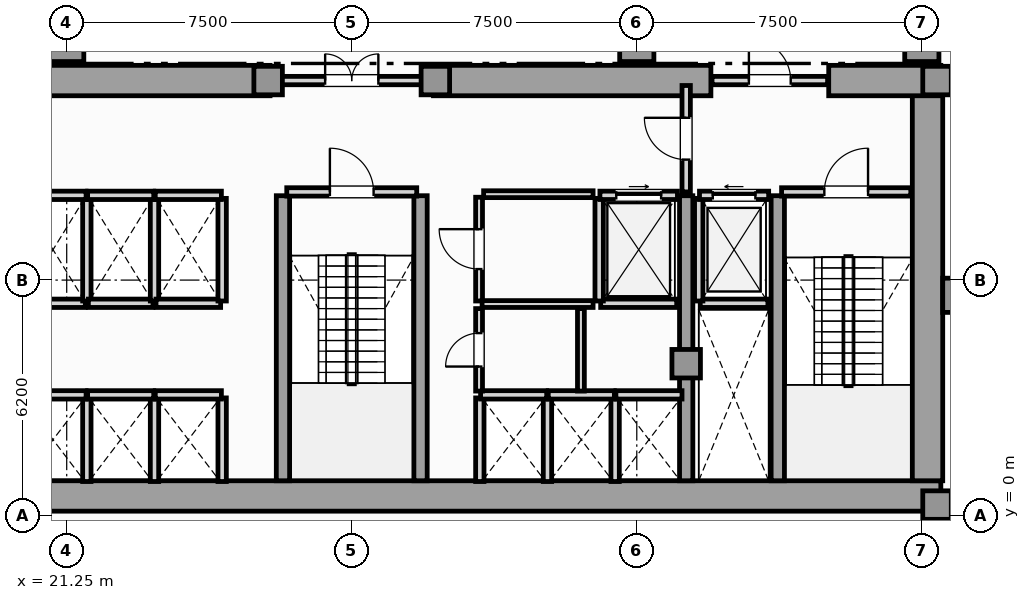
"""IFC4 building model, lengths in metres.
Left out: names, types, materials, properties, quantities, classifications, styles, units other than length and angle.
Written with IfcOpenShell. Run it as: python <this file> out.ifc"""

import sys

from ifc_helpers import new_model, si_unit, direction, frame, frame_2d, origin, origin_2d, place, context, subcontext, project, spatial, rectangle, extrude, element, fill, save


model = new_model("IFC4")
c1 = context("Model", 3, precision=1e-05, world=origin(), true_north=direction((0.0, 1.0)))
c2 = subcontext(c1, "Body", "Model", "MODEL_VIEW")
j1 = project(units=[si_unit("LENGTHUNIT", "METRE"), si_unit("PLANEANGLEUNIT", "RADIAN")], contexts=[c1])
p1 = place(None, origin())
s1 = spatial("IfcSite", under=j1, at=p1, CompositionType="ELEMENT")
p2 = place(p1, origin())
s2 = spatial("IfcBuilding", under=s1, at=p2, CompositionType="ELEMENT")
p3 = place(p2, frame((0.0, 0.0, 10.2)))
s3 = spatial("IfcBuildingStorey", under=s2, at=p3, CompositionType="ELEMENT", Elevation=10.2)
p4 = place(p3, frame((13.25, 0.52, 0.0), z_axis=(0.0, 0.0, 1.0), x_axis=(1.0, 0.0, 0.0)))
e1 = element("IfcWall", 1, at=p4, inside=s3, PredefinedType="SHEAR", context=c2, shape_type="SweptSolid", body=[
    extrude(rectangle(XDim=31.0, YDim=0.8, at=frame_2d((15.5, 0.0))), origin(), (0.0, 0.0, 1.0), 4.52),
])
p5 = place(p3, frame((43.9, 0.92, 0.0), z_axis=(0.0, 0.0, 1.0), x_axis=(0.0, 1.0, 0.0)))
e2 = element("IfcWall", 2, at=p5, inside=s3, PredefinedType="SHEAR", context=c2, shape_type="SweptSolid", body=[
    extrude(rectangle(XDim=10.53, YDim=0.8, at=frame_2d((5.265, 0.0))), origin(), (0.0, 0.0, 1.0), 4.52),
])
for number, where, z_axis, x_axis in (
    (3, (19.3, 11.45, 0.0), (0.0, 0.0, 1.0), (1.0, 0.0, 0.0)),
    (4, (30.9, 11.45, 0.0), (0.0, 0.0, 1.0), (1.0, 0.0, 0.0)),
):
    element("IfcWall", number, at=place(p3, frame(where, z_axis=z_axis, x_axis=x_axis)), inside=s3, PredefinedType="SHEAR", context=c2, shape_type="SweptSolid", body=[
        extrude(rectangle(XDim=7.3, YDim=0.8, at=frame_2d((3.65, 0.0))), origin(), (0.0, 0.0, 1.0), 4.52),
    ])
p6 = place(p3, frame((41.3, 11.45, 0.0), z_axis=(0.0, 0.0, 1.0), x_axis=(1.0, 0.0, 0.0)))
e5 = element("IfcWall", 5, at=p6, inside=s3, PredefinedType="SHEAR", context=c2, shape_type="SweptSolid", body=[
    extrude(rectangle(XDim=2.95, YDim=0.8, at=frame_2d((1.475, 0.0))), origin(), (0.0, 0.0, 1.0), 4.52),
])
for number, where, z_axis, x_axis in (
    (6, (26.94, 0.92, 0.0), (0.0, 0.0, 1.0), (0.0, 1.0, 0.0)),
    (7, (30.56, 0.92, 0.0), (0.0, 0.0, 1.0), (0.0, 1.0, 0.0)),
    (8, (37.55, 0.92, 0.0), (0.0, 0.0, 1.0), (0.0, 1.0, 0.0)),
    (9, (39.96, 0.92, 0.0), (0.0, 0.0, 1.0), (0.0, 1.0, 0.0)),
):
    element("IfcWall", number, at=place(p3, frame(where, z_axis=z_axis, x_axis=x_axis)), inside=s3, PredefinedType="SHEAR", context=c2, shape_type="SweptSolid", body=[
        extrude(rectangle(XDim=7.5, YDim=0.35, at=frame_2d((3.75, 0.0))), origin(), (0.0, 0.0, 1.0), 4.52),
    ])
p7 = place(p3, frame((44.6, 5.8, 0.0), z_axis=(0.0, 0.0, 1.0), x_axis=(1.0, 0.0, 0.0)))
e10 = element("IfcColumn", 10, at=p7, inside=s3, PredefinedType="PILASTER", context=c2, shape_type="SweptSolid", body=[
    extrude(rectangle(XDim=0.6, YDim=0.9, at=origin_2d()), origin(), (0.0, 0.0, 1.0), 4.8),
])
for number, where, z_axis, x_axis in (
    (11, (44.15, 0.28, 0.0), (0.0, 0.0, 1.0), (1.0, 0.0, 0.0)),
    (12, (44.15, 11.45, 0.0), (0.0, 0.0, 1.0), (1.0, 0.0, 0.0)),
    (13, (37.55, 4.0, 0.0), (0.0, 0.0, 1.0), (1.0, 0.0, 0.0)),
    (14, (26.55, 11.45, 0.0), (0.0, 0.0, 1.0), (1.0, 0.0, 0.0)),
    (15, (30.95, 11.45, 0.0), (0.0, 0.0, 1.0), (1.0, 0.0, 0.0)),
):
    element("IfcColumn", number, at=place(p3, frame(where, z_axis=z_axis, x_axis=x_axis)), inside=s3, PredefinedType="COLUMN", context=c2, shape_type="SweptSolid", body=[
        extrude(rectangle(XDim=0.75, YDim=0.75, at=origin_2d()), origin(), (0.0, 0.0, 1.0), 4.8),
    ])
for number, where, z_axis, x_axis in (
    (16, (43.75, 12.4, 0.0), (0.0, 0.0, 1.0), (1.0, 0.0, 0.0)),
    (17, (21.25, 12.4, 0.0), (0.0, 0.0, 1.0), (1.0, 0.0, 0.0)),
    (18, (36.25, 12.4, 0.0), (0.0, 0.0, 1.0), (1.0, 0.0, 0.0)),
):
    element("IfcColumn", number, at=place(p3, frame(where, z_axis=z_axis, x_axis=x_axis)), inside=s3, PredefinedType="COLUMN", context=c2, shape_type="SweptSolid", body=[
        extrude(rectangle(XDim=0.9, YDim=0.9, at=origin_2d()), origin(), (0.0, 0.0, 1.0), 4.8),
    ])
p8 = place(p3, frame((37.92, 5.59, 0.0), z_axis=(0.0, 0.0, 1.0), x_axis=(1.0, 0.0, 0.0)))
e19 = element("IfcWall", 19, at=p8, inside=s3, PredefinedType="SOLIDWALL", context=c2, shape_type="SweptSolid", body=[
    extrude(rectangle(XDim=1.78, YDim=0.22, at=frame_2d((0.89, 0.0))), origin(), (0.0, 0.0, 1.0), 4.52),
])
p9 = place(p3, frame((37.88, 5.65, 0.0), z_axis=(0.0, 0.0, 1.0), x_axis=(0.0, 1.0, 0.0)))
e20 = element("IfcWall", 20, at=p9, inside=s3, PredefinedType="SOLIDWALL", context=c2, shape_type="SweptSolid", body=[
    extrude(rectangle(XDim=2.7, YDim=0.22, at=frame_2d((1.35, 0.0))), origin(), (0.0, 0.0, 1.0), 4.52),
])
p10 = place(p3, frame((37.9, 8.43, 0.0), z_axis=(0.0, 0.0, 1.0), x_axis=(1.0, 0.0, 0.0)))
e21 = element("IfcWall", 21, at=p10, inside=s3, PredefinedType="SOLIDWALL", context=c2, shape_type="SweptSolid", body=[
    extrude(rectangle(XDim=1.82, YDim=0.22, at=frame_2d((0.91, 0.0))), origin(), (0.0, 0.0, 1.0), 4.52),
])
p11 = place(p10, frame((0.35, 0.0, 0.0)))
e22 = element("IfcOpeningElement", 22, at=p11, cuts=e21, PredefinedType="OPENING", context=c2, shape_type="SweptSolid", body=[
    extrude(rectangle(XDim=1.12, YDim=2.25, at=frame_2d((0.56, 1.125))), frame((0.0, 0.12, 0.0), z_axis=(0.0, -1.0, 0.0), x_axis=(1.0, 0.0, 0.0)), (0.0, 0.0, 1.0), 0.24),
])
p12 = place(p3, frame((35.3, 5.59, 0.0), z_axis=(0.0, 0.0, 1.0), x_axis=(1.0, 0.0, 0.0)))
e23 = element("IfcWall", 23, at=p12, inside=s3, PredefinedType="SOLIDWALL", context=c2, shape_type="SweptSolid", body=[
    extrude(rectangle(XDim=2.0, YDim=0.22, at=frame_2d((1.0, 0.0))), origin(), (0.0, 0.0, 1.0), 4.52),
])
p13 = place(p3, frame((35.26, 5.65, 0.0), z_axis=(0.0, 0.0, 1.0), x_axis=(0.0, 1.0, 0.0)))
e24 = element("IfcWall", 24, at=p13, inside=s3, PredefinedType="SOLIDWALL", context=c2, shape_type="SweptSolid", body=[
    extrude(rectangle(XDim=2.7, YDim=0.22, at=frame_2d((1.35, 0.0))), origin(), (0.0, 0.0, 1.0), 4.52),
])
p14 = place(p3, frame((35.28, 8.43, 0.0), z_axis=(0.0, 0.0, 1.0), x_axis=(1.0, 0.0, 0.0)))
e25 = element("IfcWall", 25, at=p14, inside=s3, PredefinedType="SOLIDWALL", context=c2, shape_type="SweptSolid", body=[
    extrude(rectangle(XDim=2.04, YDim=0.22, at=frame_2d((1.02, 0.0))), origin(), (0.0, 0.0, 1.0), 4.52),
])
p15 = place(p14, frame((0.43, 0.0, 0.0)))
e26 = element("IfcOpeningElement", 26, at=p15, cuts=e25, PredefinedType="OPENING", context=c2, shape_type="SweptSolid", body=[
    extrude(rectangle(XDim=1.18, YDim=2.2, at=frame_2d((0.59, 1.1))), frame((0.0, 0.12, 0.0), z_axis=(0.0, -1.0, 0.0), x_axis=(1.0, 0.0, 0.0)), (0.0, 0.0, 1.0), 0.24),
])
p16 = place(p3, frame((21.78, 0.9, 0.0), z_axis=(0.0, 0.0, 1.0), x_axis=(0.0, 1.0, 0.0)))
e27 = element("IfcWall", 27, at=p16, inside=s3, PredefinedType="SOLIDWALL", context=c2, shape_type="SweptSolid", body=[
    extrude(rectangle(XDim=2.2, YDim=0.22, at=frame_2d((1.1, 0.0))), origin(), (0.0, 0.0, 1.0), 4.52),
])
p17 = place(p3, frame((20.02, 3.18, 0.0), z_axis=(0.0, 0.0, 1.0), x_axis=(1.0, 0.0, 0.0)))
e28 = element("IfcWall", 28, at=p17, inside=s3, PredefinedType="SOLIDWALL", context=c2, shape_type="SweptSolid", body=[
    extrude(rectangle(XDim=1.74, YDim=0.22, at=frame_2d((0.87, 0.0))), origin(), (0.0, 0.0, 1.0), 4.52),
])
p18 = place(p3, frame((23.56, 0.9, 0.0), z_axis=(0.0, 0.0, 1.0), x_axis=(0.0, 1.0, 0.0)))
e29 = element("IfcWall", 29, at=p18, inside=s3, PredefinedType="SOLIDWALL", context=c2, shape_type="SweptSolid", body=[
    extrude(rectangle(XDim=2.2, YDim=0.22, at=frame_2d((1.1, 0.0))), origin(), (0.0, 0.0, 1.0), 4.52),
])
p19 = place(p3, frame((21.8, 3.18, 0.0), z_axis=(0.0, 0.0, 1.0), x_axis=(1.0, 0.0, 0.0)))
e30 = element("IfcWall", 30, at=p19, inside=s3, PredefinedType="SOLIDWALL", context=c2, shape_type="SweptSolid", body=[
    extrude(rectangle(XDim=1.74, YDim=0.22, at=frame_2d((0.87, 0.0))), origin(), (0.0, 0.0, 1.0), 4.52),
])
p20 = place(p3, frame((25.34, 0.9, 0.0), z_axis=(0.0, 0.0, 1.0), x_axis=(0.0, 1.0, 0.0)))
e31 = element("IfcWall", 31, at=p20, inside=s3, PredefinedType="SOLIDWALL", context=c2, shape_type="SweptSolid", body=[
    extrude(rectangle(XDim=2.2, YDim=0.22, at=frame_2d((1.1, 0.0))), origin(), (0.0, 0.0, 1.0), 4.52),
])
p21 = place(p3, frame((23.58, 3.18, 0.0), z_axis=(0.0, 0.0, 1.0), x_axis=(1.0, 0.0, 0.0)))
e32 = element("IfcWall", 32, at=p21, inside=s3, PredefinedType="SOLIDWALL", context=c2, shape_type="SweptSolid", body=[
    extrude(rectangle(XDim=1.74, YDim=0.22, at=frame_2d((0.87, 0.0))), origin(), (0.0, 0.0, 1.0), 4.52),
])
for number, where, z_axis, x_axis in (
    (33, (32.12, 0.9, 0.0), (0.0, 0.0, 1.0), (0.0, 1.0, 0.0)),
    (34, (33.9, 0.9, 0.0), (0.0, 0.0, 1.0), (0.0, 1.0, 0.0)),
):
    element("IfcWall", number, at=place(p3, frame(where, z_axis=z_axis, x_axis=x_axis)), inside=s3, PredefinedType="SOLIDWALL", context=c2, shape_type="SweptSolid", body=[
        extrude(rectangle(XDim=2.2, YDim=0.22, at=frame_2d((1.1, 0.0))), origin(), (0.0, 0.0, 1.0), 4.52),
    ])
p22 = place(p3, frame((32.14, 3.18, 0.0), z_axis=(0.0, 0.0, 1.0), x_axis=(1.0, 0.0, 0.0)))
e35 = element("IfcWall", 35, at=p22, inside=s3, PredefinedType="SOLIDWALL", context=c2, shape_type="SweptSolid", body=[
    extrude(rectangle(XDim=1.74, YDim=0.22, at=frame_2d((0.87, 0.0))), origin(), (0.0, 0.0, 1.0), 4.52),
])
p23 = place(p3, frame((35.68, 0.9, 0.0), z_axis=(0.0, 0.0, 1.0), x_axis=(0.0, 1.0, 0.0)))
e36 = element("IfcWall", 36, at=p23, inside=s3, PredefinedType="SOLIDWALL", context=c2, shape_type="SweptSolid", body=[
    extrude(rectangle(XDim=2.2, YDim=0.22, at=frame_2d((1.1, 0.0))), origin(), (0.0, 0.0, 1.0), 4.52),
])
for number, where, z_axis, x_axis in (
    (37, (33.92, 3.18, 0.0), (0.0, 0.0, 1.0), (1.0, 0.0, 0.0)),
    (38, (35.7, 3.18, 0.0), (0.0, 0.0, 1.0), (1.0, 0.0, 0.0)),
):
    element("IfcWall", number, at=place(p3, frame(where, z_axis=z_axis, x_axis=x_axis)), inside=s3, PredefinedType="SOLIDWALL", context=c2, shape_type="SweptSolid", body=[
        extrude(rectangle(XDim=1.74, YDim=0.22, at=frame_2d((0.87, 0.0))), origin(), (0.0, 0.0, 1.0), 4.52),
    ])
p24 = place(p3, frame((20.04, 5.59, 0.0), z_axis=(0.0, 0.0, 1.0), x_axis=(1.0, 0.0, 0.0)))
e39 = element("IfcWall", 39, at=p24, inside=s3, PredefinedType="SOLIDWALL", context=c2, shape_type="SweptSolid", body=[
    extrude(rectangle(XDim=1.7, YDim=0.22, at=frame_2d((0.85, 0.0))), origin(), (0.0, 0.0, 1.0), 4.52),
])
p25 = place(p3, frame((21.78, 5.65, 0.0), z_axis=(0.0, 0.0, 1.0), x_axis=(0.0, 1.0, 0.0)))
e40 = element("IfcWall", 40, at=p25, inside=s3, PredefinedType="SOLIDWALL", context=c2, shape_type="SweptSolid", body=[
    extrude(rectangle(XDim=2.7, YDim=0.22, at=frame_2d((1.35, 0.0))), origin(), (0.0, 0.0, 1.0), 4.52),
])
p26 = place(p3, frame((20.02, 8.43, 0.0), z_axis=(0.0, 0.0, 1.0), x_axis=(1.0, 0.0, 0.0)))
e41 = element("IfcWall", 41, at=p26, inside=s3, PredefinedType="SOLIDWALL", context=c2, shape_type="SweptSolid", body=[
    extrude(rectangle(XDim=1.74, YDim=0.22, at=frame_2d((0.87, 0.0))), origin(), (0.0, 0.0, 1.0), 4.52),
])
p27 = place(p3, frame((21.82, 5.59, 0.0), z_axis=(0.0, 0.0, 1.0), x_axis=(1.0, 0.0, 0.0)))
e42 = element("IfcWall", 42, at=p27, inside=s3, PredefinedType="SOLIDWALL", context=c2, shape_type="SweptSolid", body=[
    extrude(rectangle(XDim=1.7, YDim=0.22, at=frame_2d((0.85, 0.0))), origin(), (0.0, 0.0, 1.0), 4.52),
])
p28 = place(p3, frame((23.56, 5.65, 0.0), z_axis=(0.0, 0.0, 1.0), x_axis=(0.0, 1.0, 0.0)))
e43 = element("IfcWall", 43, at=p28, inside=s3, PredefinedType="SOLIDWALL", context=c2, shape_type="SweptSolid", body=[
    extrude(rectangle(XDim=2.7, YDim=0.22, at=frame_2d((1.35, 0.0))), origin(), (0.0, 0.0, 1.0), 4.52),
])
p29 = place(p3, frame((21.8, 8.43, 0.0), z_axis=(0.0, 0.0, 1.0), x_axis=(1.0, 0.0, 0.0)))
e44 = element("IfcWall", 44, at=p29, inside=s3, PredefinedType="SOLIDWALL", context=c2, shape_type="SweptSolid", body=[
    extrude(rectangle(XDim=1.74, YDim=0.22, at=frame_2d((0.87, 0.0))), origin(), (0.0, 0.0, 1.0), 4.52),
])
p30 = place(p3, frame((23.6, 5.59, 0.0), z_axis=(0.0, 0.0, 1.0), x_axis=(1.0, 0.0, 0.0)))
e45 = element("IfcWall", 45, at=p30, inside=s3, PredefinedType="SOLIDWALL", context=c2, shape_type="SweptSolid", body=[
    extrude(rectangle(XDim=1.7, YDim=0.22, at=frame_2d((0.85, 0.0))), origin(), (0.0, 0.0, 1.0), 4.52),
])
p31 = place(p3, frame((25.34, 5.65, 0.0), z_axis=(0.0, 0.0, 1.0), x_axis=(0.0, 1.0, 0.0)))
e46 = element("IfcWall", 46, at=p31, inside=s3, PredefinedType="SOLIDWALL", context=c2, shape_type="SweptSolid", body=[
    extrude(rectangle(XDim=2.7, YDim=0.22, at=frame_2d((1.35, 0.0))), origin(), (0.0, 0.0, 1.0), 4.52),
])
p32 = place(p3, frame((23.58, 8.43, 0.0), z_axis=(0.0, 0.0, 1.0), x_axis=(1.0, 0.0, 0.0)))
e47 = element("IfcWall", 47, at=p32, inside=s3, PredefinedType="SOLIDWALL", context=c2, shape_type="SweptSolid", body=[
    extrude(rectangle(XDim=1.74, YDim=0.22, at=frame_2d((0.87, 0.0))), origin(), (0.0, 0.0, 1.0), 4.52),
])
p33 = place(p3, frame((40.06, 8.52, 0.0), z_axis=(0.0, 0.0, 1.0), x_axis=(1.0, 0.0, 0.0)))
e48 = element("IfcWall", 48, at=p33, inside=s3, PredefinedType="SOLIDWALL", context=c2, shape_type="SweptSolid", body=[
    extrude(rectangle(XDim=3.4, YDim=0.22, at=frame_2d((1.7, 0.0))), origin(), (0.0, 0.0, 1.0), 4.52),
])
p34 = place(p33, frame((1.125, 0.0, 0.0)))
e49 = element("IfcOpeningElement", 49, at=p34, cuts=e48, PredefinedType="OPENING", context=c2, shape_type="SweptSolid", body=[
    extrude(rectangle(XDim=1.15, YDim=2.2, at=frame_2d((0.575, 1.1))), frame((0.0, 0.12, 0.0), z_axis=(0.0, -1.0, 0.0), x_axis=(1.0, 0.0, 0.0)), (0.0, 0.0, 1.0), 0.24),
])
p35 = place(p3, frame((27.04, 8.52, 0.0), z_axis=(0.0, 0.0, 1.0), x_axis=(1.0, 0.0, 0.0)))
e50 = element("IfcWall", 50, at=p35, inside=s3, PredefinedType="SOLIDWALL", context=c2, shape_type="SweptSolid", body=[
    extrude(rectangle(XDim=3.42, YDim=0.22, at=frame_2d((1.71, 0.0))), origin(), (0.0, 0.0, 1.0), 4.52),
])
p36 = place(p35, frame((1.135, 0.0, 0.0)))
e51 = element("IfcOpeningElement", 51, at=p36, cuts=e50, PredefinedType="OPENING", context=c2, shape_type="SweptSolid", body=[
    extrude(rectangle(XDim=1.15, YDim=2.2, at=frame_2d((0.575, 1.1))), frame((0.0, 0.12, 0.0), z_axis=(0.0, -1.0, 0.0), x_axis=(1.0, 0.0, 0.0)), (0.0, 0.0, 1.0), 0.24),
])
p37 = place(p3, frame((37.55, 8.52, 0.0), z_axis=(0.0, 0.0, 1.0), x_axis=(0.0, 1.0, 0.0)))
e52 = element("IfcWall", 52, at=p37, inside=s3, PredefinedType="SOLIDWALL", context=c2, shape_type="SweptSolid", body=[
    extrude(rectangle(XDim=2.8, YDim=0.22, at=frame_2d((1.4, 0.0))), origin(), (0.0, 0.0, 1.0), 3.976),
])
p38 = place(p37, frame((0.85, 0.0, 0.0)))
e53 = element("IfcOpeningElement", 53, at=p38, cuts=e52, PredefinedType="OPENING", context=c2, shape_type="SweptSolid", body=[
    extrude(rectangle(XDim=1.1, YDim=2.2, at=frame_2d((0.55, 1.1))), frame((0.0, 0.12, 0.0), z_axis=(0.0, -1.0, 0.0), x_axis=(1.0, 0.0, 0.0)), (0.0, 0.0, 1.0), 0.24),
])
p39 = place(p3, frame((26.63, 11.45, 0.0), z_axis=(0.0, 0.0, 1.0), x_axis=(1.0, 0.0, 0.0)))
e54 = element("IfcWall", 54, at=p39, inside=s3, PredefinedType="SOLIDWALL", context=c2, shape_type="SweptSolid", body=[
    extrude(rectangle(XDim=4.24, YDim=0.22, at=frame_2d((2.12, 0.0))), origin(), (0.0, 0.0, 1.0), 4.52),
])
p40 = place(p39, frame((1.42, 0.0, 0.0)))
e55 = element("IfcOpeningElement", 55, at=p40, cuts=e54, PredefinedType="OPENING", context=c2, shape_type="SweptSolid", body=[
    extrude(rectangle(XDim=1.4, YDim=2.2, at=frame_2d((0.7, 1.1))), frame((0.0, 0.12, 0.0), z_axis=(0.0, -1.0, 0.0), x_axis=(1.0, 0.0, 0.0)), (0.0, 0.0, 1.0), 0.24),
])
p41 = place(p3, frame((38.23, 11.45, 0.0), z_axis=(0.0, 0.0, 1.0), x_axis=(1.0, 0.0, 0.0)))
e56 = element("IfcWall", 56, at=p41, inside=s3, PredefinedType="SOLIDWALL", context=c2, shape_type="SweptSolid", body=[
    extrude(rectangle(XDim=3.04, YDim=0.22, at=frame_2d((1.52, 0.0))), origin(), (0.0, 0.0, 1.0), 4.52),
])
p42 = place(p41, frame((0.97, 0.0, 0.0)))
e57 = element("IfcOpeningElement", 57, at=p42, cuts=e56, PredefinedType="OPENING", context=c2, shape_type="SweptSolid", body=[
    extrude(rectangle(XDim=1.1, YDim=2.2, at=frame_2d((0.55, 1.1))), frame((0.0, 0.12, 0.0), z_axis=(0.0, -1.0, 0.0), x_axis=(1.0, 0.0, 0.0)), (0.0, 0.0, 1.0), 0.24),
])
p43 = place(p3, frame((32.1, 5.65, 0.0), z_axis=(0.0, 0.0, 1.0), x_axis=(0.0, 1.0, 0.0)))
e58 = element("IfcWall", 58, at=p43, inside=s3, PredefinedType="PARTITIONING", context=c2, shape_type="SweptSolid", body=[
    extrude(rectangle(XDim=2.73, YDim=0.18, at=frame_2d((1.365, 0.0))), origin(), (0.0, 0.0, 1.0), 4.52),
])
p44 = place(p43, frame((0.84, 0.0, 0.0)))
e59 = element("IfcOpeningElement", 59, at=p44, cuts=e58, PredefinedType="OPENING", context=c2, shape_type="SweptSolid", body=[
    extrude(rectangle(XDim=1.05, YDim=2.15, at=frame_2d((0.525, 1.075))), frame((0.0, 0.1, 0.0), z_axis=(0.0, -1.0, 0.0), x_axis=(1.0, 0.0, 0.0)), (0.0, 0.0, 1.0), 0.2),
])
p45 = place(p3, frame((32.22, 8.46, 0.0), z_axis=(0.0, 0.0, 1.0), x_axis=(1.0, 0.0, 0.0)))
e60 = element("IfcWall", 60, at=p45, inside=s3, PredefinedType="PARTITIONING", context=c2, shape_type="SweptSolid", body=[
    extrude(rectangle(XDim=2.88, YDim=0.18, at=frame_2d((1.44, 0.0))), origin(), (0.0, 0.0, 1.0), 4.52),
])
p46 = place(p3, frame((32.18, 5.57, 0.0), z_axis=(0.0, 0.0, 1.0), x_axis=(1.0, 0.0, 0.0)))
e61 = element("IfcWall", 61, at=p46, inside=s3, PredefinedType="PARTITIONING", context=c2, shape_type="SweptSolid", body=[
    extrude(rectangle(XDim=2.92, YDim=0.18, at=frame_2d((1.46, 0.0))), origin(), (0.0, 0.0, 1.0), 4.52),
])
p47 = place(p3, frame((32.1, 3.28, 0.0), z_axis=(0.0, 0.0, 1.0), x_axis=(0.0, 1.0, 0.0)))
e62 = element("IfcWall", 62, at=p47, inside=s3, PredefinedType="PARTITIONING", context=c2, shape_type="SweptSolid", body=[
    extrude(rectangle(XDim=2.17, YDim=0.18, at=frame_2d((1.085, 0.0))), origin(), (0.0, 0.0, 1.0), 4.52),
])
p48 = place(p47, frame((0.645, 0.0, 0.0)))
e63 = element("IfcOpeningElement", 63, at=p48, cuts=e62, PredefinedType="OPENING", context=c2, shape_type="SweptSolid", body=[
    extrude(rectangle(XDim=0.88, YDim=2.05, at=frame_2d((0.44, 1.025))), frame((0.0, 0.1, 0.0), z_axis=(0.0, -1.0, 0.0), x_axis=(1.0, 0.0, 0.0)), (0.0, 0.0, 1.0), 0.2),
])
p49 = place(p3, frame((34.78, 3.28, 0.0), z_axis=(0.0, 0.0, 1.0), x_axis=(0.0, 1.0, 0.0)))
e64 = element("IfcWall", 64, at=p49, inside=s3, PredefinedType="PARTITIONING", context=c2, shape_type="SweptSolid", body=[
    extrude(rectangle(XDim=2.17, YDim=0.18, at=frame_2d((1.085, 0.0))), origin(), (0.0, 0.0, 1.0), 4.52),
])
p50 = place(p11, origin())
e65 = element("IfcDoor", 65, at=p50, inside=s3, OperationType="SLIDING_TO_LEFT", PredefinedType="DOOR", context=c2, shape_type="SweptSolid", body=[
    extrude(rectangle(XDim=1.12, YDim=2.25, at=frame_2d((0.56, 1.125))), frame((0.0, 0.025, 0.0), z_axis=(0.0, -1.0, 0.0), x_axis=(1.0, 0.0, 0.0)), (0.0, 0.0, 1.0), 0.05),
])
fill(e22, e65)
p51 = place(p15, origin())
e66 = element("IfcDoor", 66, at=p51, inside=s3, OperationType="SLIDING_TO_RIGHT", PredefinedType="DOOR", context=c2, shape_type="SweptSolid", body=[
    extrude(rectangle(XDim=1.18, YDim=2.2, at=frame_2d((0.59, 1.1))), frame((0.0, 0.025, 0.0), z_axis=(0.0, -1.0, 0.0), x_axis=(1.0, 0.0, 0.0)), (0.0, 0.0, 1.0), 0.05),
])
fill(e26, e66)
p52 = place(p34, origin())
e67 = element("IfcDoor", 67, at=p52, inside=s3, OperationType="SINGLE_SWING_RIGHT", PredefinedType="DOOR", context=c2, shape_type="SweptSolid", body=[
    extrude(rectangle(XDim=1.15, YDim=2.2, at=frame_2d((0.575, 1.1))), frame((0.0, 0.025, 0.0), z_axis=(0.0, -1.0, 0.0), x_axis=(1.0, 0.0, 0.0)), (0.0, 0.0, 1.0), 0.05),
])
fill(e49, e67)
p53 = place(p36, origin())
e68 = element("IfcDoor", 68, at=p53, inside=s3, OperationType="SINGLE_SWING_LEFT", PredefinedType="DOOR", context=c2, shape_type="SweptSolid", body=[
    extrude(rectangle(XDim=1.15, YDim=2.2, at=frame_2d((0.575, 1.1))), frame((0.0, 0.025, 0.0), z_axis=(0.0, -1.0, 0.0), x_axis=(1.0, 0.0, 0.0)), (0.0, 0.0, 1.0), 0.05),
])
fill(e51, e68)
p54 = place(p38, origin())
e69 = element("IfcDoor", 69, at=p54, inside=s3, OperationType="SINGLE_SWING_RIGHT", PredefinedType="DOOR", context=c2, shape_type="SweptSolid", body=[
    extrude(rectangle(XDim=1.1, YDim=2.2, at=frame_2d((0.55, 1.1))), frame((0.0, 0.025, 0.0), z_axis=(0.0, -1.0, 0.0), x_axis=(1.0, 0.0, 0.0)), (0.0, 0.0, 1.0), 0.05),
])
fill(e53, e69)
p55 = place(p40, origin())
e70 = element("IfcDoor", 70, at=p55, inside=s3, OperationType="DOUBLE_DOOR_SINGLE_SWING", PredefinedType="DOOR", context=c2, shape_type="SweptSolid", body=[
    extrude(rectangle(XDim=1.4, YDim=2.2, at=frame_2d((0.7, 1.1))), frame((0.0, 0.025, 0.0), z_axis=(0.0, -1.0, 0.0), x_axis=(1.0, 0.0, 0.0)), (0.0, 0.0, 1.0), 0.05),
])
fill(e55, e70)
p56 = place(p42, origin())
e71 = element("IfcDoor", 71, at=p56, inside=s3, OperationType="SINGLE_SWING_LEFT", PredefinedType="DOOR", context=c2, shape_type="SweptSolid", body=[
    extrude(rectangle(XDim=1.1, YDim=2.2, at=frame_2d((0.55, 1.1))), frame((0.0, 0.025, 0.0), z_axis=(0.0, -1.0, 0.0), x_axis=(1.0, 0.0, 0.0)), (0.0, 0.0, 1.0), 0.05),
])
fill(e57, e71)
p57 = place(p44, origin())
e72 = element("IfcDoor", 72, at=p57, inside=s3, OperationType="SINGLE_SWING_RIGHT", PredefinedType="DOOR", context=c2, shape_type="SweptSolid", body=[
    extrude(rectangle(XDim=1.05, YDim=2.15, at=frame_2d((0.525, 1.075))), frame((0.0, 0.025, 0.0), z_axis=(0.0, -1.0, 0.0), x_axis=(1.0, 0.0, 0.0)), (0.0, 0.0, 1.0), 0.05),
])
fill(e59, e72)
p58 = place(p48, origin())
e73 = element("IfcDoor", 73, at=p58, inside=s3, OperationType="SINGLE_SWING_LEFT", PredefinedType="DOOR", context=c2, shape_type="SweptSolid", body=[
    extrude(rectangle(XDim=0.88, YDim=2.05, at=frame_2d((0.44, 1.025))), frame((0.0, 0.025, 0.0), z_axis=(0.0, -1.0, 0.0), x_axis=(1.0, 0.0, 0.0)), (0.0, 0.0, 1.0), 0.05),
])
fill(e63, e73)
save(model, sys.argv[1])
